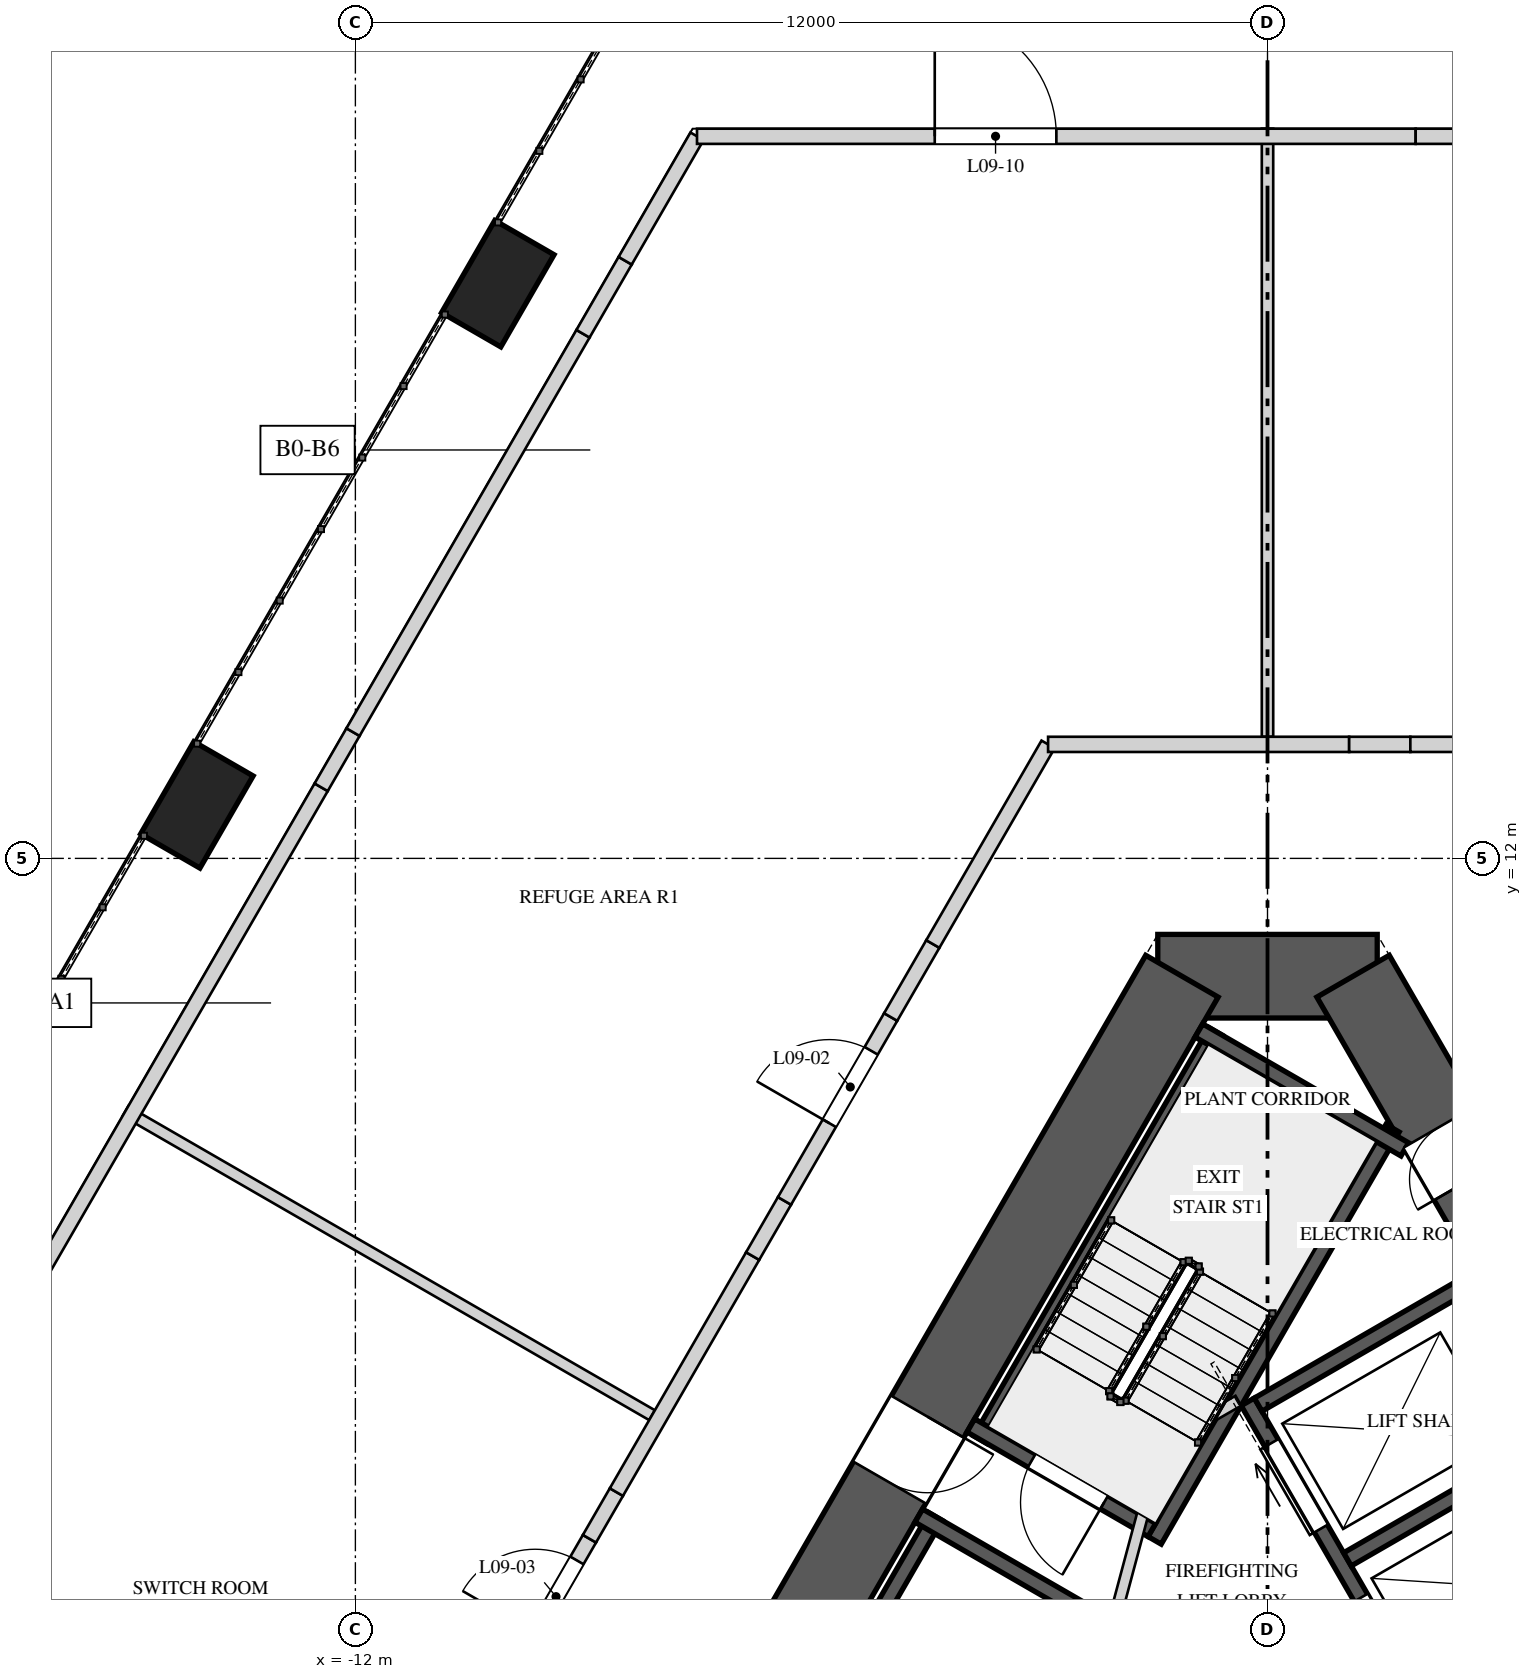
"""IFC4 building model, lengths in metres.
Left out: names, types, materials, properties, quantities, classifications, styles, units other than length and angle.
Written with IfcOpenShell. Run it as: python <this file> out.ifc"""

import sys

from ifc_helpers import new_model, si_unit, direction, frame, frame_2d, origin, origin_2d, place, context, subcontext, project, spatial, rectangle, extrude, element, fill, save


model = new_model("IFC4")
c1 = context("Model", 3, precision=1e-05, world=origin(), true_north=direction((0.0, 1.0)))
c2 = subcontext(c1, "Body", "Model", "MODEL_VIEW")
j1 = project(units=[si_unit("LENGTHUNIT", "METRE"), si_unit("PLANEANGLEUNIT", "RADIAN")], contexts=[c1])
p1 = place(None, origin())
s1 = spatial("IfcSite", under=j1, at=p1, CompositionType="ELEMENT")
p2 = place(p1, origin())
s2 = spatial("IfcBuilding", under=s1, at=p2, CompositionType="ELEMENT")
p3 = place(p2, frame((0.0, 0.0, 46.0)))
s3 = spatial("IfcBuildingStorey", under=s2, at=p3, CompositionType="ELEMENT", Elevation=46.0)
p4 = place(p3, frame((1.443, 10.45, 0.0), z_axis=(0.0, 0.0, 1.0), x_axis=(-1.0, 0.0, 0.0)))
e1 = element("IfcWall", 1, at=p4, inside=s3, PredefinedType="SHEAR", context=c2, shape_type="SweptSolid", body=[
    extrude(rectangle(XDim=2.887, YDim=1.1, at=frame_2d((1.443, 0.0))), origin(), (0.0, 0.0, 1.0), 5.2),
])
p5 = place(p3, frame((-1.126, 10.45, 0.0), z_axis=(0.0, 0.0, 1.0), x_axis=(-0.500001757713, -0.866024388966, 0.0)))
e2 = element("IfcWall", 2, at=p5, inside=s3, PredefinedType="SHEAR", context=c2, shape_type="SweptSolid", body=[
    extrude(rectangle(XDim=16.974, YDim=1.1, at=frame_2d((8.487, 0.0))), origin(), (0.0, 0.0, 1.0), 5.2),
])
p6 = place(p5, frame((6.692, 0.0, 0.0)))
e3 = element("IfcOpeningElement", 3, at=p6, cuts=e2, PredefinedType="OPENING", context=c2, shape_type="SweptSolid", body=[
    extrude(rectangle(XDim=1.0, YDim=2.4, at=frame_2d((0.5, 1.2))), frame((0.0, 0.56, 0.0), z_axis=(0.0, -1.0, 0.0), x_axis=(1.0, 0.0, 0.0)), (0.0, 0.0, 1.0), 1.12),
])
p7 = place(p3, frame((9.613, -4.25, 0.0), z_axis=(0.0, 0.0, 1.0), x_axis=(-0.500001757713, 0.866024388966, 0.0)))
e4 = element("IfcWall", 4, at=p7, inside=s3, PredefinedType="SHEAR", context=c2, shape_type="SweptSolid", body=[
    extrude(rectangle(XDim=16.974, YDim=1.1, at=frame_2d((8.487, 0.0))), origin(), (0.0, 0.0, 1.0), 5.2),
])
p8 = place(p7, frame((6.762, 0.0, 0.0)))
e5 = element("IfcOpeningElement", 5, at=p8, cuts=e4, PredefinedType="OPENING", context=c2, shape_type="SweptSolid", body=[
    extrude(rectangle(XDim=1.0, YDim=2.4, at=frame_2d((0.5, 1.2))), frame((0.0, 0.56, 0.0), z_axis=(0.0, -1.0, 0.0), x_axis=(1.0, 0.0, 0.0)), (0.0, 0.0, 1.0), 1.12),
])
p9 = place(p7, frame((13.889, 0.0, 0.0)))
e6 = element("IfcOpeningElement", 6, at=p9, cuts=e4, PredefinedType="OPENING", context=c2, shape_type="SweptSolid", body=[
    extrude(rectangle(XDim=0.8, YDim=2.1, at=frame_2d((0.4, 1.05))), frame((0.0, 0.56, 0.0), z_axis=(0.0, -1.0, 0.0), x_axis=(1.0, 0.0, 0.0)), (0.0, 0.0, 1.0), 1.12),
])
for number, where, z_axis, x_axis in (
    (7, (-10.126, 19.561, 0.0), (0.0, 0.0, 1.0), (-0.5, -0.866, 0.0)),
    (8, (-14.085, 12.704, 0.0), (0.0, 0.0, 1.0), (-0.5, -0.866, 0.0)),
):
    element("IfcColumn", number, at=place(p3, frame(where, z_axis=z_axis, x_axis=x_axis)), inside=s3, PredefinedType="COLUMN", context=c2, shape_type="SweptSolid", body=[
        extrude(rectangle(XDim=1.4, YDim=0.9, at=origin_2d()), origin(), (0.0, 0.0, 1.0), 2.898),
    ])
p10 = place(p3, frame((-0.68, 9.722, 0.0), z_axis=(0.0, 0.0, 1.0), x_axis=(-0.49998037582, -0.866036733513, 0.0)))
e9 = element("IfcWall", 9, at=p10, inside=s3, PredefinedType="SOLIDWALL", context=c2, shape_type="SweptSolid", body=[
    extrude(rectangle(XDim=6.2, YDim=0.2, at=frame_2d((3.1, 0.0))), origin(), (0.0, 0.0, 1.0), 4.85),
])
p11 = place(p3, frame((1.646, 8.45, 0.0), z_axis=(0.0, 0.0, 1.0), x_axis=(-0.500006002103, -0.866021938441, 0.0)))
e10 = element("IfcWall", 10, at=p11, inside=s3, PredefinedType="SOLIDWALL", context=c2, shape_type="SweptSolid", body=[
    extrude(rectangle(XDim=6.261, YDim=0.2, at=frame_2d((3.13, 0.0))), origin(), (0.0, 0.0, 1.0), 4.85),
])
p12 = place(p3, frame((1.806, 8.172, 0.0), z_axis=(0.0, 0.0, 1.0), x_axis=(-0.866054327916, 0.499949898588, 0.0)))
e11 = element("IfcWall", 11, at=p12, inside=s3, PredefinedType="SOLIDWALL", context=c2, shape_type="SweptSolid", body=[
    extrude(rectangle(XDim=3.128, YDim=0.2, at=frame_2d((1.564, 0.0))), origin(), (0.0, 0.0, 1.0), 4.85),
])
p13 = place(p3, frame((-1.521, 3.165, 0.0), z_axis=(0.0, 0.0, 1.0), x_axis=(-0.866027397988, 0.499996545922, 0.0)))
e12 = element("IfcWall", 12, at=p13, inside=s3, PredefinedType="SOLIDWALL", context=c2, shape_type="SweptSolid", body=[
    extrude(rectangle(XDim=2.75, YDim=0.2, at=frame_2d((1.375, 0.0))), origin(), (0.0, 0.0, 1.0), 4.85),
])
p14 = place(p13, frame((0.725, 0.0, 0.0)))
e13 = element("IfcOpeningElement", 13, at=p14, cuts=e12, PredefinedType="OPENING", context=c2, shape_type="SweptSolid", body=[
    extrude(rectangle(XDim=1.1, YDim=2.4, at=frame_2d((0.55, 1.2))), frame((0.0, 0.11, 0.0), z_axis=(0.0, -1.0, 0.0), x_axis=(1.0, 0.0, 0.0)), (0.0, 0.0, 1.0), 0.22),
])
p15 = place(p3, frame((-4.365, 3.34, 0.0), z_axis=(0.0, 0.0, 1.0), x_axis=(-0.499996545922, -0.866027397988, 0.0)))
e14 = element("IfcWall", 14, at=p15, inside=s3, PredefinedType="SOLIDWALL", context=c2, shape_type="SweptSolid", body=[
    extrude(rectangle(XDim=5.5, YDim=0.2, at=frame_2d((2.75, 0.0))), origin(), (0.0, 0.0, 1.0), 4.85),
])
p16 = place(p3, frame((-2.38, 2.078, 0.0), z_axis=(0.0, 0.0, 1.0), x_axis=(-0.866054858364, 0.499948979701, 0.0)))
e15 = element("IfcWall", 15, at=p16, inside=s3, PredefinedType="SOLIDWALL", context=c2, shape_type="SweptSolid", body=[
    extrude(rectangle(XDim=2.55, YDim=0.2, at=frame_2d((1.275, 0.0))), origin(), (0.0, 0.0, 1.0), 4.85),
])
p17 = place(p3, frame((2.19, 0.606, 0.0), z_axis=(0.0, 0.0, 1.0), x_axis=(-0.500002801628, 0.866023786258, 0.0)))
e16 = element("IfcWall", 16, at=p17, inside=s3, PredefinedType="SOLIDWALL", context=c2, shape_type="SweptSolid", body=[
    extrude(rectangle(XDim=4.9, YDim=0.2, at=frame_2d((2.45, 0.0))), origin(), (0.0, 0.0, 1.0), 4.85),
])
p18 = place(p17, frame((0.625, 0.0, 0.0)))
e17 = element("IfcOpeningElement", 17, at=p18, cuts=e16, PredefinedType="OPENING", context=c2, shape_type="SweptSolid", body=[
    extrude(rectangle(XDim=1.3, YDim=2.1, at=frame_2d((0.65, 1.05))), frame((0.0, 0.11, 0.0), z_axis=(0.0, -1.0, 0.0), x_axis=(1.0, 0.0, 0.0)), (0.0, 0.0, 1.0), 0.22),
])
p19 = place(p17, frame((2.975, 0.0, 0.0)))
e18 = element("IfcOpeningElement", 18, at=p19, cuts=e16, PredefinedType="OPENING", context=c2, shape_type="SweptSolid", body=[
    extrude(rectangle(XDim=1.3, YDim=2.1, at=frame_2d((0.65, 1.05))), frame((0.0, 0.11, 0.0), z_axis=(0.0, -1.0, 0.0), x_axis=(1.0, 0.0, 0.0)), (0.0, 0.0, 1.0), 0.22),
])
p20 = place(p3, frame((2.227, 0.743, 0.0), z_axis=(0.0, 0.0, 1.0), x_axis=(0.866014461049, 0.500018952895, 0.0)))
e19 = element("IfcWall", 19, at=p20, inside=s3, PredefinedType="SOLIDWALL", context=c2, shape_type="SweptSolid", body=[
    extrude(rectangle(XDim=3.35, YDim=0.2, at=frame_2d((1.675, 0.0))), origin(), (0.0, 0.0, 1.0), 4.85),
])
p21 = place(p3, frame((1.052, 2.778, 0.0), z_axis=(0.0, 0.0, 1.0), x_axis=(0.866032680314, 0.499987396469, 0.0)))
e20 = element("IfcWall", 20, at=p21, inside=s3, PredefinedType="SOLIDWALL", context=c2, shape_type="SweptSolid", body=[
    extrude(rectangle(XDim=3.35, YDim=0.2, at=frame_2d((1.675, 0.0))), origin(), (0.0, 0.0, 1.0), 4.85),
])
p22 = place(p3, frame((-0.123, 4.813, 0.0), z_axis=(0.0, 0.0, 1.0), x_axis=(0.866014461049, 0.500018952895, 0.0)))
e21 = element("IfcWall", 21, at=p22, inside=s3, PredefinedType="SOLIDWALL", context=c2, shape_type="SweptSolid", body=[
    extrude(rectangle(XDim=3.35, YDim=0.2, at=frame_2d((1.675, 0.0))), origin(), (0.0, 0.0, 1.0), 4.85),
])
p23 = place(p3, frame((-2.178, 1.372, 0.0), z_axis=(0.0, 0.0, 1.0), x_axis=(0.258808958833, 0.96592852884, 0.0)))
e22 = element("IfcWall", 22, at=p23, inside=s3, PredefinedType="PARTITIONING", context=c2, shape_type="SweptSolid", body=[
    extrude(rectangle(XDim=2.903, YDim=0.15, at=frame_2d((1.451, 0.0))), origin(), (0.0, 0.0, 1.0), 4.85),
])
p24 = place(p3, frame((-1.51, 4.215, 0.0), z_axis=(0.0, 0.0, 1.0), x_axis=(0.866085525409, 0.49989585183, 0.0)))
e23 = element("IfcWall", 23, at=p24, inside=s3, PredefinedType="PARTITIONING", context=c2, shape_type="SweptSolid", body=[
    extrude(rectangle(XDim=1.3, YDim=0.15, at=frame_2d((0.65, 0.0))), origin(), (0.0, 0.0, 1.0), 4.85),
])
for number, where, z_axis, x_axis in (
    (24, (-8.097, 4.675, 0.0), (0.0, 0.0, 1.0), (-0.866, 0.5, 0.0)),
    (25, (0.0, 13.6, 0.0), (0.0, 0.0, 1.0), (0.0, 1.0, 0.0)),
):
    element("IfcWall", number, at=place(p3, frame(where, z_axis=z_axis, x_axis=x_axis)), inside=s3, PredefinedType="PARTITIONING", context=c2, shape_type="SweptSolid", body=[
        extrude(rectangle(XDim=8.0, YDim=0.15, at=frame_2d((4.0, 0.0))), origin(), (0.0, 0.0, 1.0), 4.85),
    ])
p25 = place(p3, frame((-11.049, -0.637, 0.0), z_axis=(0.0, 0.0, 1.0), x_axis=(0.500000470374, 0.866025132214, 0.0)))
e26 = element("IfcWall", 26, at=p25, inside=s3, PredefinedType="SOLIDWALL", context=c2, shape_type="SweptSolid", body=[
    extrude(rectangle(XDim=4.257, YDim=0.2, at=frame_2d((2.128, 0.0))), origin(), (0.0, 0.0, 1.0), 4.85),
])
p26 = place(p25, frame((2.827, 0.0, 0.0)))
e27 = element("IfcOpeningElement", 27, at=p26, cuts=e26, PredefinedType="OPENING", context=c2, shape_type="SweptSolid", body=[
    extrude(rectangle(XDim=1.1, YDim=2.2, at=frame_2d((0.55, 1.1))), frame((0.0, 0.11, 0.0), z_axis=(0.0, -1.0, 0.0), x_axis=(1.0, 0.0, 0.0)), (0.0, 0.0, 1.0), 0.22),
])
p27 = place(p3, frame((-8.92, 3.049, 0.0), z_axis=(0.0, 0.0, 1.0), x_axis=(0.499881507708, 0.866093804534, 0.0)))
e28 = element("IfcWall", 28, at=p27, inside=s3, PredefinedType="SOLIDWALL", context=c2, shape_type="SweptSolid", body=[
    extrude(rectangle(XDim=0.709, YDim=0.2, at=frame_2d((0.354, 0.0))), origin(), (0.0, 0.0, 1.0), 4.15),
])
p28 = place(p3, frame((-8.566, 3.663, 0.0), z_axis=(0.0, 0.0, 1.0), x_axis=(0.500013241293, 0.866017758786, 0.0)))
e29 = element("IfcWall", 29, at=p28, inside=s3, PredefinedType="SOLIDWALL", context=c2, shape_type="SweptSolid", body=[
    extrude(rectangle(XDim=3.585, YDim=0.2, at=frame_2d((1.793, 0.0))), origin(), (0.0, 0.0, 1.0), 4.85),
])
p29 = place(p3, frame((-6.773, 6.768, 0.0), z_axis=(0.0, 0.0, 1.0), x_axis=(0.500117447933, 0.865957584569, 0.0)))
e30 = element("IfcWall", 30, at=p29, inside=s3, PredefinedType="SOLIDWALL", context=c2, shape_type="SweptSolid", body=[
    extrude(rectangle(XDim=0.838, YDim=0.2, at=frame_2d((0.419, 0.0))), origin(), (0.0, 0.0, 1.0), 3.95),
])
p30 = place(p3, frame((-6.354, 7.494, 0.0), z_axis=(0.0, 0.0, 1.0), x_axis=(0.499964529649, 0.866045881633, 0.0)))
e31 = element("IfcWall", 31, at=p30, inside=s3, PredefinedType="SOLIDWALL", context=c2, shape_type="SweptSolid", body=[
    extrude(rectangle(XDim=2.794, YDim=0.2, at=frame_2d((1.397, 0.0))), origin(), (0.0, 0.0, 1.0), 4.85),
])
p31 = place(p30, frame((1.18, 0.0, 0.0)))
e32 = element("IfcOpeningElement", 32, at=p31, cuts=e31, PredefinedType="OPENING", context=c2, shape_type="SweptSolid", body=[
    extrude(rectangle(XDim=1.1, YDim=2.2, at=frame_2d((0.55, 1.1))), frame((0.0, 0.11, 0.0), z_axis=(0.0, -1.0, 0.0), x_axis=(1.0, 0.0, 0.0)), (0.0, 0.0, 1.0), 0.22),
])
p32 = place(p3, frame((-4.958, 9.913, 0.0), z_axis=(0.0, 0.0, 1.0), x_axis=(0.499951133605, 0.866053614973, 0.0)))
e33 = element("IfcWall", 33, at=p32, inside=s3, PredefinedType="SOLIDWALL", context=c2, shape_type="SweptSolid", body=[
    extrude(rectangle(XDim=1.109, YDim=0.2, at=frame_2d((0.554, 0.0))), origin(), (0.0, 0.0, 1.0), 3.75),
])
p33 = place(p3, frame((-4.403, 10.874, 0.0), z_axis=(0.0, 0.0, 1.0), x_axis=(0.500026757412, 0.866009954834, 0.0)))
e34 = element("IfcWall", 34, at=p33, inside=s3, PredefinedType="SOLIDWALL", context=c2, shape_type="SweptSolid", body=[
    extrude(rectangle(XDim=3.032, YDim=0.2, at=frame_2d((1.516, 0.0))), origin(), (0.0, 0.0, 1.0), 4.85),
])
p34 = place(p3, frame((-2.887, 13.5, 0.0), z_axis=(0.0, 0.0, 1.0), x_axis=(1.0, 0.0, 0.0)))
e35 = element("IfcWall", 35, at=p34, inside=s3, PredefinedType="SOLIDWALL", context=c2, shape_type="SweptSolid", body=[
    extrude(rectangle(XDim=3.961, YDim=0.2, at=frame_2d((1.98, 0.0))), origin(), (0.0, 0.0, 1.0), 4.85),
])
p35 = place(p3, frame((1.074, 13.5, 0.0), z_axis=(0.0, 0.0, 1.0), x_axis=(1.0, 0.0, 0.0)))
e36 = element("IfcWall", 36, at=p35, inside=s3, PredefinedType="SOLIDWALL", context=c2, shape_type="SweptSolid", body=[
    extrude(rectangle(XDim=0.805, YDim=0.2, at=frame_2d((0.402, 0.0))), origin(), (0.0, 0.0, 1.0), 3.95),
])
p36 = place(p3, frame((1.879, 13.5, 0.0), z_axis=(0.0, 0.0, 1.0), x_axis=(1.0, 0.0, 0.0)))
e37 = element("IfcWall", 37, at=p36, inside=s3, PredefinedType="SOLIDWALL", context=c2, shape_type="SweptSolid", body=[
    extrude(rectangle(XDim=1.008, YDim=0.2, at=frame_2d((0.504, 0.0))), origin(), (0.0, 0.0, 1.0), 4.85),
])
p37 = place(p3, frame((-16.128, 6.566, 0.0), z_axis=(0.0, 0.0, 1.0), x_axis=(0.500008815681, 0.866020313989, 0.0)))
e38 = element("IfcWall", 38, at=p37, inside=s3, PredefinedType="SOLIDWALL", context=c2, shape_type="SweptSolid", body=[
    extrude(rectangle(XDim=7.355, YDim=0.2, at=frame_2d((3.678, 0.0))), origin(), (0.0, 0.0, 1.0), 4.85),
])
p38 = place(p3, frame((-12.45, 12.936, 0.0), z_axis=(0.0, 0.0, 1.0), x_axis=(0.499898978922, 0.866083720475, 0.0)))
e39 = element("IfcWall", 39, at=p38, inside=s3, PredefinedType="SOLIDWALL", context=c2, shape_type="SweptSolid", body=[
    extrude(rectangle(XDim=0.838, YDim=0.2, at=frame_2d((0.419, 0.0))), origin(), (0.0, 0.0, 1.0), 3.95),
])
p39 = place(p3, frame((-12.031, 13.661, 0.0), z_axis=(0.0, 0.0, 1.0), x_axis=(0.500000658726, 0.866025023469, 0.0)))
e40 = element("IfcWall", 40, at=p39, inside=s3, PredefinedType="SOLIDWALL", context=c2, shape_type="SweptSolid", body=[
    extrude(rectangle(XDim=6.052, YDim=0.2, at=frame_2d((3.026, 0.0))), origin(), (0.0, 0.0, 1.0), 4.85),
])
p40 = place(p3, frame((-9.005, 18.902, 0.0), z_axis=(0.0, 0.0, 1.0), x_axis=(0.499951133605, 0.866053614973, 0.0)))
e41 = element("IfcWall", 41, at=p40, inside=s3, PredefinedType="SOLIDWALL", context=c2, shape_type="SweptSolid", body=[
    extrude(rectangle(XDim=1.109, YDim=0.2, at=frame_2d((0.554, 0.0))), origin(), (0.0, 0.0, 1.0), 3.75),
])
p41 = place(p3, frame((-8.451, 19.863, 0.0), z_axis=(0.0, 0.0, 1.0), x_axis=(0.5000279999, 0.866009237431, 0.0)))
e42 = element("IfcWall", 42, at=p41, inside=s3, PredefinedType="SOLIDWALL", context=c2, shape_type="SweptSolid", body=[
    extrude(rectangle(XDim=1.891, YDim=0.2, at=frame_2d((0.945, 0.0))), origin(), (0.0, 0.0, 1.0), 4.85),
])
p42 = place(p3, frame((-7.506, 21.5, 0.0), z_axis=(0.0, 0.0, 1.0), x_axis=(1.0, 0.0, 0.0)))
e43 = element("IfcWall", 43, at=p42, inside=s3, PredefinedType="SOLIDWALL", context=c2, shape_type="SweptSolid", body=[
    extrude(rectangle(XDim=9.455, YDim=0.2, at=frame_2d((4.728, 0.0))), origin(), (0.0, 0.0, 1.0), 4.85),
])
p43 = place(p42, frame((3.128, 0.0, 0.0)))
e44 = element("IfcOpeningElement", 44, at=p43, cuts=e43, PredefinedType="OPENING", context=c2, shape_type="SweptSolid", body=[
    extrude(rectangle(XDim=1.6, YDim=2.3, at=frame_2d((0.8, 1.15))), frame((0.0, 0.11, 0.0), z_axis=(0.0, -1.0, 0.0), x_axis=(1.0, 0.0, 0.0)), (0.0, 0.0, 1.0), 0.22),
])
p44 = place(p3, frame((1.949, 21.5, 0.0), z_axis=(0.0, 0.0, 1.0), x_axis=(1.0, 0.0, 0.0)))
e45 = element("IfcWall", 45, at=p44, inside=s3, PredefinedType="SOLIDWALL", context=c2, shape_type="SweptSolid", body=[
    extrude(rectangle(XDim=0.805, YDim=0.2, at=frame_2d((0.402, 0.0))), origin(), (0.0, 0.0, 1.0), 3.95),
])
p45 = place(p14, origin())
e46 = element("IfcDoor", 46, at=p45, inside=s3, OperationType="SINGLE_SWING_RIGHT", PredefinedType="DOOR", context=c2, shape_type="SweptSolid", body=[
    extrude(rectangle(XDim=1.1, YDim=2.4, at=frame_2d((0.55, 1.2))), frame((0.0, 0.025, 0.0), z_axis=(0.0, -1.0, 0.0), x_axis=(1.0, 0.0, 0.0)), (0.0, 0.0, 1.0), 0.05),
])
fill(e13, e46)
p46 = place(p18, origin())
e47 = element("IfcDoor", 47, at=p46, inside=s3, OperationType="SLIDING_TO_LEFT", PredefinedType="DOOR", context=c2, shape_type="SweptSolid", body=[
    extrude(rectangle(XDim=1.3, YDim=2.1, at=frame_2d((0.65, 1.05))), frame((0.0, 0.025, 0.0), z_axis=(0.0, -1.0, 0.0), x_axis=(1.0, 0.0, 0.0)), (0.0, 0.0, 1.0), 0.05),
])
fill(e17, e47)
p47 = place(p19, origin())
e48 = element("IfcDoor", 48, at=p47, inside=s3, OperationType="SLIDING_TO_RIGHT", PredefinedType="DOOR", context=c2, shape_type="SweptSolid", body=[
    extrude(rectangle(XDim=1.3, YDim=2.1, at=frame_2d((0.65, 1.05))), frame((0.0, 0.025, 0.0), z_axis=(0.0, -1.0, 0.0), x_axis=(1.0, 0.0, 0.0)), (0.0, 0.0, 1.0), 0.05),
])
fill(e18, e48)
p48 = place(p6, origin())
e49 = element("IfcDoor", 49, at=p48, inside=s3, OperationType="SINGLE_SWING_RIGHT", PredefinedType="DOOR", context=c2, shape_type="SweptSolid", body=[
    extrude(rectangle(XDim=1.0, YDim=2.4, at=frame_2d((0.5, 1.2))), frame((0.0, 0.025, 0.0), z_axis=(0.0, -1.0, 0.0), x_axis=(1.0, 0.0, 0.0)), (0.0, 0.0, 1.0), 0.05),
])
fill(e3, e49)
p49 = place(p9, origin())
e50 = element("IfcDoor", 50, at=p49, inside=s3, OperationType="SINGLE_SWING_RIGHT", PredefinedType="DOOR", context=c2, shape_type="SweptSolid", body=[
    extrude(rectangle(XDim=0.8, YDim=2.1, at=frame_2d((0.4, 1.05))), frame((0.0, 0.025, 0.0), z_axis=(0.0, -1.0, 0.0), x_axis=(1.0, 0.0, 0.0)), (0.0, 0.0, 1.0), 0.05),
])
fill(e6, e50)
p50 = place(p31, origin())
e51 = element("IfcDoor", 51, at=p50, inside=s3, OperationType="SINGLE_SWING_RIGHT", PredefinedType="DOOR", context=c2, shape_type="SweptSolid", body=[
    extrude(rectangle(XDim=1.1, YDim=2.2, at=frame_2d((0.55, 1.1))), frame((0.0, 0.025, 0.0), z_axis=(0.0, -1.0, 0.0), x_axis=(1.0, 0.0, 0.0)), (0.0, 0.0, 1.0), 0.05),
])
fill(e32, e51)
p51 = place(p26, origin())
e52 = element("IfcDoor", 52, at=p51, inside=s3, OperationType="SINGLE_SWING_LEFT", PredefinedType="DOOR", context=c2, shape_type="SweptSolid", body=[
    extrude(rectangle(XDim=1.1, YDim=2.2, at=frame_2d((0.55, 1.1))), frame((0.0, 0.025, 0.0), z_axis=(0.0, -1.0, 0.0), x_axis=(1.0, 0.0, 0.0)), (0.0, 0.0, 1.0), 0.05),
])
fill(e27, e52)
p52 = place(p43, origin())
e53 = element("IfcDoor", 53, at=p52, inside=s3, OperationType="DOUBLE_DOOR_SINGLE_SWING", PredefinedType="DOOR", context=c2, shape_type="SweptSolid", body=[
    extrude(rectangle(XDim=1.6, YDim=2.3, at=frame_2d((0.8, 1.15))), frame((0.0, 0.025, 0.0), z_axis=(0.0, -1.0, 0.0), x_axis=(1.0, 0.0, 0.0)), (0.0, 0.0, 1.0), 0.05),
])
fill(e44, e53)
save(model, sys.argv[1])
